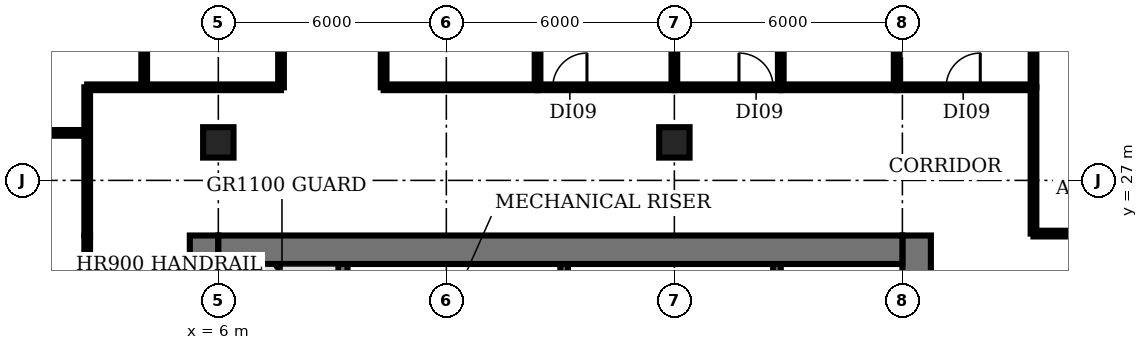
"""IFC4 building model, lengths in metres.
Left out: names, types, materials, properties, quantities, classifications, styles, units other than length and angle.
Written with IfcOpenShell. Run it as: python <this file> out.ifc"""

import sys

from ifc_helpers import new_model, si_unit, direction, frame, frame_2d, origin, origin_2d, place, context, subcontext, project, spatial, rectangle, extrude, element, fill, save


model = new_model("IFC4")
c1 = context("Model", 3, precision=1e-05, world=origin(), true_north=direction((0.0, 1.0)))
c2 = subcontext(c1, "Body", "Model", "MODEL_VIEW")
j1 = project(units=[si_unit("LENGTHUNIT", "METRE"), si_unit("PLANEANGLEUNIT", "RADIAN")], contexts=[c1])
p1 = place(None, origin())
s1 = spatial("IfcSite", under=j1, at=p1, CompositionType="ELEMENT")
p2 = place(p1, origin())
s2 = spatial("IfcBuilding", under=s1, at=p2, CompositionType="ELEMENT")
p3 = place(p2, frame((0.0, 0.0, 108.8)))
s3 = spatial("IfcBuildingStorey", under=s2, at=p3, CompositionType="ELEMENT", Elevation=108.8)
for number, where, z_axis, x_axis in (
    (1, (6.0, 28.0, 0.0), (0.0, 0.0, 1.0), (1.0, 0.0, 0.0)),
    (2, (18.0, 28.0, 0.0), (0.0, 0.0, 1.0), (1.0, 0.0, 0.0)),
):
    element("IfcColumn", number, at=place(p3, frame(where, z_axis=z_axis, x_axis=x_axis)), inside=s3, PredefinedType="COLUMN", context=c2, shape_type="SweptSolid", body=[
        extrude(rectangle(XDim=0.8, YDim=0.8, at=origin_2d()), origin(), (0.0, 0.0, 1.0), 3.85),
    ])
p4 = place(p3, frame((9.275, 18.375, 0.0), z_axis=(0.0, 0.0, 1.0), x_axis=(0.0, 1.0, 0.0)))
e3 = element("IfcWall", 3, at=p4, inside=s3, PredefinedType="SHEAR", context=c2, shape_type="SweptSolid", body=[
    extrude(rectangle(XDim=6.425, YDim=0.25, at=frame_2d((3.212, 0.0))), origin(), (0.0, 0.0, 1.0), 3.85),
])
for number, where, z_axis, x_axis in (
    (4, (15.1, 22.9, 0.0), (0.0, 0.0, 1.0), (0.0, 1.0, 0.0)),
    (5, (20.7, 22.9, 0.0), (0.0, 0.0, 1.0), (0.0, 1.0, 0.0)),
):
    element("IfcWall", number, at=place(p3, frame(where, z_axis=z_axis, x_axis=x_axis)), inside=s3, PredefinedType="SHEAR", context=c2, shape_type="SweptSolid", body=[
        extrude(rectangle(XDim=1.9, YDim=0.2, at=frame_2d((0.95, 0.0))), origin(), (0.0, 0.0, 1.0), 3.85),
    ])
p5 = place(p3, frame((5.625, 4.47, 0.0), z_axis=(0.0, 0.0, 1.0), x_axis=(0.0, 1.0, 0.0)))
e6 = element("IfcWall", 6, at=p5, inside=s3, PredefinedType="SHEAR", context=c2, shape_type="SweptSolid", body=[
    extrude(rectangle(XDim=21.08, YDim=0.75, at=frame_2d((10.54, 0.0))), origin(), (0.0, 0.0, 1.0), 3.85),
])
p6 = place(p5, frame((1.18, 0.0, 0.0)))
e7 = element("IfcOpeningElement", 7, at=p6, cuts=e6, PredefinedType="OPENING", context=c2, shape_type="SweptSolid", body=[
    extrude(rectangle(XDim=1.5, YDim=2.1, at=frame_2d((0.75, 1.05))), frame((0.0, 0.385, 0.0), z_axis=(0.0, -1.0, 0.0), x_axis=(1.0, 0.0, 0.0)), (0.0, 0.0, 1.0), 0.77),
])
p7 = place(p5, frame((7.63, 0.0, 0.0)))
e8 = element("IfcOpeningElement", 8, at=p7, cuts=e6, PredefinedType="OPENING", context=c2, shape_type="SweptSolid", body=[
    extrude(rectangle(XDim=1.2, YDim=2.1, at=frame_2d((0.6, 1.05))), frame((0.0, 0.385, 0.0), z_axis=(0.0, -1.0, 0.0), x_axis=(1.0, 0.0, 0.0)), (0.0, 0.0, 1.0), 0.77),
])
p8 = place(p5, frame((14.18, 0.0, 0.0)))
e9 = element("IfcOpeningElement", 9, at=p8, cuts=e6, PredefinedType="OPENING", context=c2, shape_type="SweptSolid", body=[
    extrude(rectangle(XDim=1.2, YDim=2.1, at=frame_2d((0.6, 1.05))), frame((0.0, 0.385, 0.0), z_axis=(0.0, -1.0, 0.0), x_axis=(1.0, 0.0, 0.0)), (0.0, 0.0, 1.0), 0.77),
])
p9 = place(p3, frame((24.375, 25.55, 0.0), z_axis=(0.0, 0.0, 1.0), x_axis=(0.0, -1.0, 0.0)))
e10 = element("IfcWall", 10, at=p9, inside=s3, PredefinedType="SHEAR", context=c2, shape_type="SweptSolid", body=[
    extrude(rectangle(XDim=21.13, YDim=0.75, at=frame_2d((10.565, 0.0))), origin(), (0.0, 0.0, 1.0), 3.85),
])
p10 = place(p9, frame((18.4, 0.0, 0.0)))
e11 = element("IfcOpeningElement", 11, at=p10, cuts=e10, PredefinedType="OPENING", context=c2, shape_type="SweptSolid", body=[
    extrude(rectangle(XDim=1.5, YDim=2.1, at=frame_2d((0.75, 1.05))), frame((0.0, 0.385, 0.0), z_axis=(0.0, -1.0, 0.0), x_axis=(1.0, 0.0, 0.0)), (0.0, 0.0, 1.0), 0.77),
])
p11 = place(p9, frame((12.3, 0.0, 0.0)))
e12 = element("IfcOpeningElement", 12, at=p11, cuts=e10, PredefinedType="OPENING", context=c2, shape_type="SweptSolid", body=[
    extrude(rectangle(XDim=0.9, YDim=2.1, at=frame_2d((0.45, 1.05))), frame((0.0, 0.385, 0.0), z_axis=(0.0, -1.0, 0.0), x_axis=(1.0, 0.0, 0.0)), (0.0, 0.0, 1.0), 0.77),
])
p12 = place(p9, frame((6.3, 0.0, 0.0)))
e13 = element("IfcOpeningElement", 13, at=p12, cuts=e10, PredefinedType="OPENING", context=c2, shape_type="SweptSolid", body=[
    extrude(rectangle(XDim=2.0, YDim=2.1, at=frame_2d((1.0, 1.05))), frame((0.0, 0.385, 0.0), z_axis=(0.0, -1.0, 0.0), x_axis=(1.0, 0.0, 0.0)), (0.0, 0.0, 1.0), 0.77),
])
p13 = place(p3, frame((6.0, 25.175, 0.0), z_axis=(0.0, 0.0, 1.0), x_axis=(1.0, 0.0, 0.0)))
e14 = element("IfcWall", 14, at=p13, inside=s3, PredefinedType="SHEAR", context=c2, shape_type="SweptSolid", body=[
    extrude(rectangle(XDim=18.0, YDim=0.75, at=frame_2d((9.0, 0.0))), origin(), (0.0, 0.0, 1.0), 3.85),
])
p14 = place(p3, frame((-0.98, 28.25, 0.0), z_axis=(0.0, 0.0, 1.0), x_axis=(1.0, 0.0, 0.0)))
e15 = element("IfcWall", 15, at=p14, inside=s3, PredefinedType="PARTITIONING", context=c2, shape_type="SweptSolid", body=[
    extrude(rectangle(XDim=3.53, YDim=0.15, at=frame_2d((1.765, 0.0))), origin(), (0.0, 0.0, 1.0), 2.83),
])
p15 = place(p3, frame((2.55, 6.12, 0.0), z_axis=(0.0, 0.0, 1.0), x_axis=(0.0, 1.0, 0.0)))
e16 = element("IfcWall", 16, at=p15, inside=s3, PredefinedType="PARTITIONING", context=c2, shape_type="SweptSolid", body=[
    extrude(rectangle(XDim=19.43, YDim=0.15, at=frame_2d((9.715, 0.0))), origin(), (0.0, 0.0, 1.0), 2.83),
])
p16 = place(p15, frame((7.53, 0.0, 0.0)))
e17 = element("IfcOpeningElement", 17, at=p16, cuts=e16, PredefinedType="OPENING", context=c2, shape_type="SweptSolid", body=[
    extrude(rectangle(XDim=1.2, YDim=2.1, at=frame_2d((0.6, 1.05))), frame((0.0, 0.085, 0.0), z_axis=(0.0, -1.0, 0.0), x_axis=(1.0, 0.0, 0.0)), (0.0, 0.0, 1.0), 0.17),
])
p17 = place(p3, frame((2.55, 25.55, 0.0), z_axis=(0.0, 0.0, 1.0), x_axis=(0.0, 1.0, 0.0)))
e18 = element("IfcWall", 18, at=p17, inside=s3, PredefinedType="PARTITIONING", context=c2, shape_type="SweptSolid", body=[
    extrude(rectangle(XDim=3.9, YDim=0.15, at=frame_2d((1.95, 0.0))), origin(), (0.0, 0.0, 1.0), 2.83),
])
p18 = place(p3, frame((2.55, 29.45, 0.0), z_axis=(0.0, 0.0, 1.0), x_axis=(1.0, 0.0, 0.0)))
e19 = element("IfcWall", 19, at=p18, inside=s3, PredefinedType="PARTITIONING", context=c2, shape_type="SweptSolid", body=[
    extrude(rectangle(XDim=5.1, YDim=0.15, at=frame_2d((2.55, 0.0))), origin(), (0.0, 0.0, 1.0), 2.83),
])
p19 = place(p3, frame((4.05, 29.45, 0.0), z_axis=(0.0, 0.0, 1.0), x_axis=(0.0, 1.0, 0.0)))
e20 = element("IfcWall", 20, at=p19, inside=s3, PredefinedType="PARTITIONING", context=c2, shape_type="SweptSolid", body=[
    extrude(rectangle(XDim=4.8, YDim=0.15, at=frame_2d((2.4, 0.0))), origin(), (0.0, 0.0, 1.0), 2.83),
])
p20 = place(p3, frame((7.65, 29.45, 0.0), z_axis=(0.0, 0.0, 1.0), x_axis=(0.0, 1.0, 0.0)))
e21 = element("IfcWall", 21, at=p20, inside=s3, PredefinedType="PARTITIONING", context=c2, shape_type="SweptSolid", body=[
    extrude(rectangle(XDim=4.8, YDim=0.15, at=frame_2d((2.4, 0.0))), origin(), (0.0, 0.0, 1.0), 2.83),
])
p21 = place(p20, frame((1.9, 0.0, 0.0)))
e22 = element("IfcOpeningElement", 22, at=p21, cuts=e21, PredefinedType="OPENING", context=c2, shape_type="SweptSolid", body=[
    extrude(rectangle(XDim=0.9, YDim=2.1, at=frame_2d((0.45, 1.05))), frame((0.0, 0.085, 0.0), z_axis=(0.0, -1.0, 0.0), x_axis=(1.0, 0.0, 0.0)), (0.0, 0.0, 1.0), 0.17),
])
p22 = place(p3, frame((10.35, 29.45, 0.0), z_axis=(0.0, 0.0, 1.0), x_axis=(0.0, 1.0, 0.0)))
e23 = element("IfcWall", 23, at=p22, inside=s3, PredefinedType="PARTITIONING", context=c2, shape_type="SweptSolid", body=[
    extrude(rectangle(XDim=4.8, YDim=0.15, at=frame_2d((2.4, 0.0))), origin(), (0.0, 0.0, 1.0), 2.83),
])
p23 = place(p3, frame((10.35, 29.45, 0.0), z_axis=(0.0, 0.0, 1.0), x_axis=(1.0, 0.0, 0.0)))
e24 = element("IfcWall", 24, at=p23, inside=s3, PredefinedType="PARTITIONING", context=c2, shape_type="SweptSolid", body=[
    extrude(rectangle(XDim=4.05, YDim=0.15, at=frame_2d((2.025, 0.0))), origin(), (0.0, 0.0, 1.0), 2.83),
])
p24 = place(p3, frame((14.4, 29.45, 0.0), z_axis=(0.0, 0.0, 1.0), x_axis=(0.0, 1.0, 0.0)))
e25 = element("IfcWall", 25, at=p24, inside=s3, PredefinedType="PARTITIONING", context=c2, shape_type="SweptSolid", body=[
    extrude(rectangle(XDim=4.8, YDim=0.15, at=frame_2d((2.4, 0.0))), origin(), (0.0, 0.0, 1.0), 2.83),
])
p25 = place(p3, frame((14.4, 29.45, 0.0), z_axis=(0.0, 0.0, 1.0), x_axis=(1.0, 0.0, 0.0)))
e26 = element("IfcWall", 26, at=p25, inside=s3, PredefinedType="PARTITIONING", context=c2, shape_type="SweptSolid", body=[
    extrude(rectangle(XDim=3.6, YDim=0.15, at=frame_2d((1.8, 0.0))), origin(), (0.0, 0.0, 1.0), 2.83),
])
p26 = place(p25, frame((0.4, 0.0, 0.0)))
e27 = element("IfcOpeningElement", 27, at=p26, cuts=e26, PredefinedType="OPENING", context=c2, shape_type="SweptSolid", body=[
    extrude(rectangle(XDim=0.9, YDim=2.1, at=frame_2d((0.45, 1.05))), frame((0.0, 0.085, 0.0), z_axis=(0.0, -1.0, 0.0), x_axis=(1.0, 0.0, 0.0)), (0.0, 0.0, 1.0), 0.17),
])
p27 = place(p3, frame((18.0, 29.45, 0.0), z_axis=(0.0, 0.0, 1.0), x_axis=(0.0, 1.0, 0.0)))
e28 = element("IfcWall", 28, at=p27, inside=s3, PredefinedType="PARTITIONING", context=c2, shape_type="SweptSolid", body=[
    extrude(rectangle(XDim=4.8, YDim=0.15, at=frame_2d((2.4, 0.0))), origin(), (0.0, 0.0, 1.0), 2.83),
])
p28 = place(p3, frame((18.0, 29.45, 0.0), z_axis=(0.0, 0.0, 1.0), x_axis=(1.0, 0.0, 0.0)))
e29 = element("IfcWall", 29, at=p28, inside=s3, PredefinedType="PARTITIONING", context=c2, shape_type="SweptSolid", body=[
    extrude(rectangle(XDim=2.8, YDim=0.15, at=frame_2d((1.4, 0.0))), origin(), (0.0, 0.0, 1.0), 2.83),
])
p29 = place(p28, frame((1.7, 0.0, 0.0)))
e30 = element("IfcOpeningElement", 30, at=p29, cuts=e29, PredefinedType="OPENING", context=c2, shape_type="SweptSolid", body=[
    extrude(rectangle(XDim=0.9, YDim=2.1, at=frame_2d((0.45, 1.05))), frame((0.0, 0.085, 0.0), z_axis=(0.0, -1.0, 0.0), x_axis=(1.0, 0.0, 0.0)), (0.0, 0.0, 1.0), 0.17),
])
p30 = place(p3, frame((20.8, 29.45, 0.0), z_axis=(0.0, 0.0, 1.0), x_axis=(0.0, 1.0, 0.0)))
e31 = element("IfcWall", 31, at=p30, inside=s3, PredefinedType="PARTITIONING", context=c2, shape_type="SweptSolid", body=[
    extrude(rectangle(XDim=4.8, YDim=0.15, at=frame_2d((2.4, 0.0))), origin(), (0.0, 0.0, 1.0), 2.83),
])
p31 = place(p3, frame((20.8, 29.45, 0.0), z_axis=(0.0, 0.0, 1.0), x_axis=(1.0, 0.0, 0.0)))
e32 = element("IfcWall", 32, at=p31, inside=s3, PredefinedType="PARTITIONING", context=c2, shape_type="SweptSolid", body=[
    extrude(rectangle(XDim=3.05, YDim=0.15, at=frame_2d((1.525, 0.0))), origin(), (0.0, 0.0, 1.0), 2.83),
])
p32 = place(p3, frame((23.85, 29.45, 0.0), z_axis=(0.0, 0.0, 1.0), x_axis=(0.0, 1.0, 0.0)))
e33 = element("IfcWall", 33, at=p32, inside=s3, PredefinedType="PARTITIONING", context=c2, shape_type="SweptSolid", body=[
    extrude(rectangle(XDim=4.8, YDim=0.15, at=frame_2d((2.4, 0.0))), origin(), (0.0, 0.0, 1.0), 2.83),
])
p33 = place(p3, frame((23.85, 29.45, 0.0), z_axis=(0.0, 0.0, 1.0), x_axis=(1.0, 0.0, 0.0)))
e34 = element("IfcWall", 34, at=p33, inside=s3, PredefinedType="PARTITIONING", context=c2, shape_type="SweptSolid", body=[
    extrude(rectangle(XDim=3.6, YDim=0.15, at=frame_2d((1.8, 0.0))), origin(), (0.0, 0.0, 1.0), 2.83),
])
p34 = place(p33, frame((1.3, 0.0, 0.0)))
e35 = element("IfcOpeningElement", 35, at=p34, cuts=e34, PredefinedType="OPENING", context=c2, shape_type="SweptSolid", body=[
    extrude(rectangle(XDim=0.9, YDim=2.1, at=frame_2d((0.45, 1.05))), frame((0.0, 0.085, 0.0), z_axis=(0.0, -1.0, 0.0), x_axis=(1.0, 0.0, 0.0)), (0.0, 0.0, 1.0), 0.17),
])
p35 = place(p3, frame((27.45, 25.6, 0.0), z_axis=(0.0, 0.0, 1.0), x_axis=(0.0, 1.0, 0.0)))
e36 = element("IfcWall", 36, at=p35, inside=s3, PredefinedType="PARTITIONING", context=c2, shape_type="SweptSolid", body=[
    extrude(rectangle(XDim=3.85, YDim=0.15, at=frame_2d((1.925, 0.0))), origin(), (0.0, 0.0, 1.0), 2.83),
])
p36 = place(p3, frame((27.45, 25.6, 0.0), z_axis=(0.0, 0.0, 1.0), x_axis=(1.0, 0.0, 0.0)))
e37 = element("IfcWall", 37, at=p36, inside=s3, PredefinedType="PARTITIONING", context=c2, shape_type="SweptSolid", body=[
    extrude(rectangle(XDim=8.55, YDim=0.15, at=frame_2d((4.275, 0.0))), origin(), (0.0, 0.0, 1.0), 2.83),
])
p37 = place(p36, frame((4.15, 0.0, 0.0)))
e38 = element("IfcOpeningElement", 38, at=p37, cuts=e37, PredefinedType="OPENING", context=c2, shape_type="SweptSolid", body=[
    extrude(rectangle(XDim=0.9, YDim=2.1, at=frame_2d((0.45, 1.05))), frame((0.0, 0.085, 0.0), z_axis=(0.0, -1.0, 0.0), x_axis=(1.0, 0.0, 0.0)), (0.0, 0.0, 1.0), 0.17),
])
p38 = place(p3, frame((27.45, 29.45, 0.0), z_axis=(0.0, 0.0, 1.0), x_axis=(0.0, 1.0, 0.0)))
e39 = element("IfcWall", 39, at=p38, inside=s3, PredefinedType="PARTITIONING", context=c2, shape_type="SweptSolid", body=[
    extrude(rectangle(XDim=2.54, YDim=0.15, at=frame_2d((1.27, 0.0))), origin(), (0.0, 0.0, 1.0), 2.83),
])
p39 = place(p26, origin())
e40 = element("IfcDoor", 40, at=p39, inside=s3, OperationType="SINGLE_SWING_RIGHT", PredefinedType="DOOR", context=c2, shape_type="SweptSolid", body=[
    extrude(rectangle(XDim=0.9, YDim=2.1, at=frame_2d((0.45, 1.05))), frame((0.0, 0.025, 0.0), z_axis=(0.0, -1.0, 0.0), x_axis=(1.0, 0.0, 0.0)), (0.0, 0.0, 1.0), 0.05),
])
fill(e27, e40)
p40 = place(p29, origin())
e41 = element("IfcDoor", 41, at=p40, inside=s3, OperationType="SINGLE_SWING_LEFT", PredefinedType="DOOR", context=c2, shape_type="SweptSolid", body=[
    extrude(rectangle(XDim=0.9, YDim=2.1, at=frame_2d((0.45, 1.05))), frame((0.0, 0.025, 0.0), z_axis=(0.0, -1.0, 0.0), x_axis=(1.0, 0.0, 0.0)), (0.0, 0.0, 1.0), 0.05),
])
fill(e30, e41)
p41 = place(p34, origin())
e42 = element("IfcDoor", 42, at=p41, inside=s3, OperationType="SINGLE_SWING_RIGHT", PredefinedType="DOOR", context=c2, shape_type="SweptSolid", body=[
    extrude(rectangle(XDim=0.9, YDim=2.1, at=frame_2d((0.45, 1.05))), frame((0.0, 0.025, 0.0), z_axis=(0.0, -1.0, 0.0), x_axis=(1.0, 0.0, 0.0)), (0.0, 0.0, 1.0), 0.05),
])
fill(e35, e42)
save(model, sys.argv[1])
